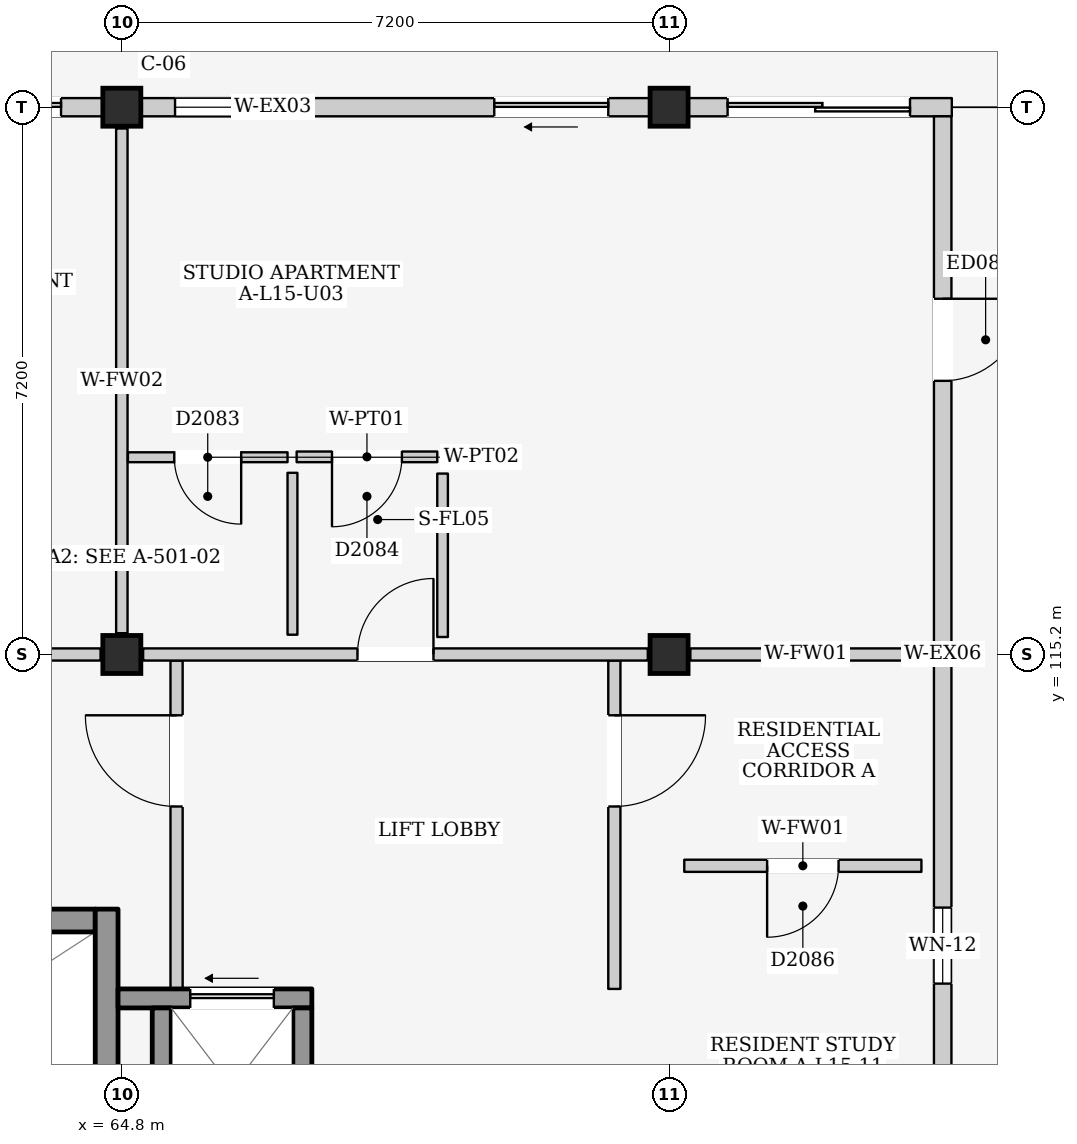
"""IFC4 building model, lengths in metres.
Left out: names, types, materials, properties, quantities, classifications, styles, units other than length and angle.
Written with IfcOpenShell. Run it as: python <this file> out.ifc"""

import sys

from ifc_helpers import new_model, si_unit, direction, frame, frame_2d, origin, origin_2d, place, context, subcontext, project, spatial, rectangle, extrude, element, fill, save


model = new_model("IFC4")
c1 = context("Model", 3, precision=1e-05, world=origin(), true_north=direction((0.0, 1.0)))
c2 = subcontext(c1, "Body", "Model", "MODEL_VIEW")
j1 = project(units=[si_unit("LENGTHUNIT", "METRE"), si_unit("PLANEANGLEUNIT", "RADIAN")], contexts=[c1])
p1 = place(None, origin())
s1 = spatial("IfcSite", under=j1, at=p1, CompositionType="ELEMENT")
p2 = place(p1, origin())
s2 = spatial("IfcBuilding", under=s1, at=p2, CompositionType="ELEMENT")
p3 = place(p2, frame((0.0, 0.0, 50.9)))
s3 = spatial("IfcBuildingStorey", under=s2, at=p3, CompositionType="ELEMENT", Elevation=50.9)
for number, where, z_axis, x_axis in (
    (1, (64.8, 115.2, 0.0), (0.0, 0.0, 1.0), (1.0, 0.0, 0.0)),
    (2, (64.8, 122.4, 0.0), (0.0, 0.0, 1.0), (1.0, 0.0, 0.0)),
    (3, (72.0, 115.2, 0.0), (0.0, 0.0, 1.0), (1.0, 0.0, 0.0)),
    (4, (72.0, 122.4, 0.0), (0.0, 0.0, 1.0), (1.0, 0.0, 0.0)),
):
    element("IfcColumn", number, at=place(p3, frame(where, z_axis=z_axis, x_axis=x_axis)), inside=s3, PredefinedType="COLUMN", context=c2, shape_type="SweptSolid", body=[
        extrude(rectangle(XDim=0.5, YDim=0.5, at=origin_2d()), origin(), (0.0, 0.0, 1.0), 3.2),
    ])
p4 = place(p3, frame((57.85, 122.4, 0.0), z_axis=(0.0, 0.0, 1.0), x_axis=(1.0, 0.0, 0.0)))
e5 = element("IfcWall", 5, at=p4, inside=s3, PredefinedType="ELEMENTEDWALL", context=c2, shape_type="SweptSolid", body=[
    extrude(rectangle(XDim=6.7, YDim=0.24, at=frame_2d((3.35, 0.0))), origin(), (0.0, 0.0, 1.0), 2.495),
])
p5 = place(p4, frame((4.55, 0.0, 0.0)))
e6 = element("IfcOpeningElement", 6, at=p5, cuts=e5, PredefinedType="OPENING", context=c2, shape_type="SweptSolid", body=[
    extrude(rectangle(XDim=1.6, YDim=2.12, at=frame_2d((0.8, 1.06))), frame((0.0, 0.135, 0.0), z_axis=(0.0, -1.0, 0.0), x_axis=(1.0, 0.0, 0.0)), (0.0, 0.0, 1.0), 0.27),
])
p6 = place(p4, frame((0.45, 0.0, 0.835)))
e7 = element("IfcOpeningElement", 7, at=p6, cuts=e5, PredefinedType="OPENING", context=c2, shape_type="SweptSolid", body=[
    extrude(rectangle(XDim=1.75, YDim=1.55, at=frame_2d((0.875, 0.775))), frame((0.0, 0.135, 0.0), z_axis=(0.0, -1.0, 0.0), x_axis=(1.0, 0.0, 0.0)), (0.0, 0.0, 1.0), 0.27),
])
p7 = place(p3, frame((65.05, 122.4, 0.0), z_axis=(0.0, 0.0, 1.0), x_axis=(1.0, 0.0, 0.0)))
e8 = element("IfcWall", 8, at=p7, inside=s3, PredefinedType="ELEMENTEDWALL", context=c2, shape_type="SweptSolid", body=[
    extrude(rectangle(XDim=6.7, YDim=0.24, at=frame_2d((3.35, 0.0))), origin(), (0.0, 0.0, 1.0), 2.495),
])
p8 = place(p7, frame((4.65, 0.0, 0.0)))
e9 = element("IfcOpeningElement", 9, at=p8, cuts=e8, PredefinedType="OPENING", context=c2, shape_type="SweptSolid", body=[
    extrude(rectangle(XDim=1.5, YDim=2.12, at=frame_2d((0.75, 1.06))), frame((0.0, 0.135, 0.0), z_axis=(0.0, -1.0, 0.0), x_axis=(1.0, 0.0, 0.0)), (0.0, 0.0, 1.0), 0.27),
])
p9 = place(p7, frame((0.45, 0.0, 0.885)))
e10 = element("IfcOpeningElement", 10, at=p9, cuts=e8, PredefinedType="OPENING", context=c2, shape_type="SweptSolid", body=[
    extrude(rectangle(XDim=1.8, YDim=1.5, at=frame_2d((0.9, 0.75))), frame((0.0, 0.135, 0.0), z_axis=(0.0, -1.0, 0.0), x_axis=(1.0, 0.0, 0.0)), (0.0, 0.0, 1.0), 0.27),
])
p10 = place(p3, frame((72.25, 122.4, 0.0), z_axis=(0.0, 0.0, 1.0), x_axis=(1.0, 0.0, 0.0)))
e11 = element("IfcWall", 11, at=p10, inside=s3, PredefinedType="ELEMENTEDWALL", context=c2, shape_type="SweptSolid", body=[
    extrude(rectangle(XDim=3.47, YDim=0.24, at=frame_2d((1.735, 0.0))), origin(), (0.0, 0.0, 1.0), 2.295),
])
p11 = place(p10, frame((0.52, 0.0, 0.0)))
e12 = element("IfcOpeningElement", 12, at=p11, cuts=e11, PredefinedType="OPENING", context=c2, shape_type="SweptSolid", body=[
    extrude(rectangle(XDim=2.4, YDim=2.12, at=frame_2d((1.2, 1.06))), frame((0.0, 0.135, 0.0), z_axis=(0.0, -1.0, 0.0), x_axis=(1.0, 0.0, 0.0)), (0.0, 0.0, 1.0), 0.27),
])
p12 = place(p3, frame((75.6, 108.12, 0.0), z_axis=(0.0, 0.0, 1.0), x_axis=(0.0, 1.0, 0.0)))
e13 = element("IfcWall", 13, at=p12, inside=s3, PredefinedType="ELEMENTEDWALL", context=c2, shape_type="SweptSolid", body=[
    extrude(rectangle(XDim=7.08, YDim=0.23, at=frame_2d((3.54, 0.0))), origin(), (0.0, 0.0, 1.0), 2.395),
])
p13 = place(p12, frame((2.75, 0.0, 1.1)))
e14 = element("IfcOpeningElement", 14, at=p13, cuts=e13, PredefinedType="OPENING", context=c2, shape_type="SweptSolid", body=[
    extrude(rectangle(XDim=1.0, YDim=0.9, at=frame_2d((0.5, 0.45))), frame((0.0, 0.13, 0.0), z_axis=(0.0, -1.0, 0.0), x_axis=(1.0, 0.0, 0.0)), (0.0, 0.0, 1.0), 0.26),
])
p14 = place(p3, frame((75.6, 115.2, 0.0), z_axis=(0.0, 0.0, 1.0), x_axis=(0.0, 1.0, 0.0)))
e15 = element("IfcWall", 15, at=p14, inside=s3, PredefinedType="ELEMENTEDWALL", context=c2, shape_type="SweptSolid", body=[
    extrude(rectangle(XDim=7.08, YDim=0.23, at=frame_2d((3.54, 0.0))), origin(), (0.0, 0.0, 1.0), 2.395),
])
p15 = place(p14, frame((3.6, 0.0, 0.0)))
e16 = element("IfcOpeningElement", 16, at=p15, cuts=e15, PredefinedType="OPENING", context=c2, shape_type="SweptSolid", body=[
    extrude(rectangle(XDim=1.08, YDim=2.12, at=frame_2d((0.54, 1.06))), frame((0.0, 0.13, 0.0), z_axis=(0.0, -1.0, 0.0), x_axis=(1.0, 0.0, 0.0)), (0.0, 0.0, 1.0), 0.26),
])
p16 = place(p3, frame((57.95, 111.7, 0.0), z_axis=(0.0, 0.0, 1.0), x_axis=(1.0, 0.0, 0.0)))
e17 = element("IfcWall", 17, at=p16, inside=s3, PredefinedType="SHEAR", context=c2, shape_type="SweptSolid", body=[
    extrude(rectangle(XDim=6.5, YDim=0.3, at=frame_2d((3.25, 0.0))), origin(), (0.0, 0.0, 1.0), 2.96),
])
p17 = place(p16, frame((0.18, 0.0, 0.0)))
e18 = element("IfcOpeningElement", 18, at=p17, cuts=e17, PredefinedType="OPENING", context=c2, shape_type="SweptSolid", body=[
    extrude(rectangle(XDim=1.15, YDim=2.2, at=frame_2d((0.575, 1.1))), frame((0.0, 0.165, 0.0), z_axis=(0.0, -1.0, 0.0), x_axis=(1.0, 0.0, 0.0)), (0.0, 0.0, 1.0), 0.33),
])
p18 = place(p3, frame((64.6, 108.15, 0.0), z_axis=(0.0, 0.0, 1.0), x_axis=(0.0, 1.0, 0.0)))
e19 = element("IfcWall", 19, at=p18, inside=s3, PredefinedType="SHEAR", context=c2, shape_type="SweptSolid", body=[
    extrude(rectangle(XDim=3.7, YDim=0.3, at=frame_2d((1.85, 0.0))), origin(), (0.0, 0.0, 1.0), 2.96),
])
p19 = place(p3, frame((65.52, 110.8, 0.0), z_axis=(0.0, 0.0, 1.0), x_axis=(0.0, 1.0, 0.0)))
e20 = element("IfcWall", 20, at=p19, inside=s3, PredefinedType="PARTITIONING", context=c2, shape_type="SweptSolid", body=[
    extrude(rectangle(XDim=4.32, YDim=0.16, at=frame_2d((2.16, 0.0))), origin(), (0.0, 0.0, 1.0), 2.96),
])
p20 = place(p19, frame((2.4, 0.0, 0.0)))
e21 = element("IfcOpeningElement", 21, at=p20, cuts=e20, PredefinedType="OPENING", context=c2, shape_type="SweptSolid", body=[
    extrude(rectangle(XDim=1.2, YDim=2.2, at=frame_2d((0.6, 1.1))), frame((0.0, 0.095, 0.0), z_axis=(0.0, -1.0, 0.0), x_axis=(1.0, 0.0, 0.0)), (0.0, 0.0, 1.0), 0.19),
])
p21 = place(p3, frame((71.28, 110.8, 0.0), z_axis=(0.0, 0.0, 1.0), x_axis=(0.0, 1.0, 0.0)))
e22 = element("IfcWall", 22, at=p21, inside=s3, PredefinedType="PARTITIONING", context=c2, shape_type="SweptSolid", body=[
    extrude(rectangle(XDim=4.32, YDim=0.16, at=frame_2d((2.16, 0.0))), origin(), (0.0, 0.0, 1.0), 2.96),
])
p22 = place(p21, frame((2.4, 0.0, 0.0)))
e23 = element("IfcOpeningElement", 23, at=p22, cuts=e22, PredefinedType="OPENING", context=c2, shape_type="SweptSolid", body=[
    extrude(rectangle(XDim=1.2, YDim=2.2, at=frame_2d((0.6, 1.1))), frame((0.0, 0.095, 0.0), z_axis=(0.0, -1.0, 0.0), x_axis=(1.0, 0.0, 0.0)), (0.0, 0.0, 1.0), 0.19),
])
p23 = place(p3, frame((64.75, 110.675, 0.0), z_axis=(0.0, 0.0, 1.0), x_axis=(1.0, 0.0, 0.0)))
e24 = element("IfcWall", 24, at=p23, inside=s3, PredefinedType="SHEAR", context=c2, shape_type="SweptSolid", body=[
    extrude(rectangle(XDim=2.55, YDim=0.25, at=frame_2d((1.275, 0.0))), origin(), (0.0, 0.0, 1.0), 2.96),
])
p24 = place(p23, frame((0.95, 0.0, 0.0)))
e25 = element("IfcOpeningElement", 25, at=p24, cuts=e24, PredefinedType="OPENING", context=c2, shape_type="SweptSolid", body=[
    extrude(rectangle(XDim=1.1, YDim=2.15, at=frame_2d((0.55, 1.075))), frame((0.0, 0.14, 0.0), z_axis=(0.0, -1.0, 0.0), x_axis=(1.0, 0.0, 0.0)), (0.0, 0.0, 1.0), 0.28),
])
for number, where, z_axis, x_axis in (
    (26, (65.325, 108.45, 0.0), (0.0, 0.0, 1.0), (0.0, 1.0, 0.0)),
    (27, (67.175, 108.45, 0.0), (0.0, 0.0, 1.0), (0.0, 1.0, 0.0)),
):
    element("IfcWall", number, at=place(p3, frame(where, z_axis=z_axis, x_axis=x_axis)), inside=s3, PredefinedType="SHEAR", context=c2, shape_type="SweptSolid", body=[
        extrude(rectangle(XDim=2.1, YDim=0.25, at=frame_2d((1.05, 0.0))), origin(), (0.0, 0.0, 1.0), 2.96),
    ])
p25 = place(p3, frame((57.88, 115.2, 0.0), z_axis=(0.0, 0.0, 1.0), x_axis=(1.0, 0.0, 0.0)))
e28 = element("IfcWall", 28, at=p25, inside=s3, PredefinedType="PARTITIONING", context=c2, shape_type="SweptSolid", body=[
    extrude(rectangle(XDim=6.64, YDim=0.16, at=frame_2d((3.32, 0.0))), origin(), (0.0, 0.0, 1.0), 2.295),
])
p26 = place(p25, frame((2.82, 0.0, 0.0)))
e29 = element("IfcOpeningElement", 29, at=p26, cuts=e28, PredefinedType="OPENING", context=c2, shape_type="SweptSolid", body=[
    extrude(rectangle(XDim=1.0, YDim=2.15, at=frame_2d((0.5, 1.075))), frame((0.0, 0.095, 0.0), z_axis=(0.0, -1.0, 0.0), x_axis=(1.0, 0.0, 0.0)), (0.0, 0.0, 1.0), 0.19),
])
p27 = place(p3, frame((64.8, 115.48, 0.0), z_axis=(0.0, 0.0, 1.0), x_axis=(0.0, 1.0, 0.0)))
e30 = element("IfcWall", 30, at=p27, inside=s3, PredefinedType="PARTITIONING", context=c2, shape_type="SweptSolid", body=[
    extrude(rectangle(XDim=6.64, YDim=0.15, at=frame_2d((3.32, 0.0))), origin(), (0.0, 0.0, 1.0), 2.445),
])
p28 = place(p3, frame((65.08, 115.2, 0.0), z_axis=(0.0, 0.0, 1.0), x_axis=(1.0, 0.0, 0.0)))
e31 = element("IfcWall", 31, at=p28, inside=s3, PredefinedType="PARTITIONING", context=c2, shape_type="SweptSolid", body=[
    extrude(rectangle(XDim=6.64, YDim=0.16, at=frame_2d((3.32, 0.0))), origin(), (0.0, 0.0, 1.0), 2.295),
])
p29 = place(p28, frame((2.82, 0.0, 0.0)))
e32 = element("IfcOpeningElement", 32, at=p29, cuts=e31, PredefinedType="OPENING", context=c2, shape_type="SweptSolid", body=[
    extrude(rectangle(XDim=1.0, YDim=2.15, at=frame_2d((0.5, 1.075))), frame((0.0, 0.095, 0.0), z_axis=(0.0, -1.0, 0.0), x_axis=(1.0, 0.0, 0.0)), (0.0, 0.0, 1.0), 0.19),
])
p30 = place(p3, frame((72.28, 115.2, 0.0), z_axis=(0.0, 0.0, 1.0), x_axis=(1.0, 0.0, 0.0)))
e33 = element("IfcWall", 33, at=p30, inside=s3, PredefinedType="PARTITIONING", context=c2, shape_type="SweptSolid", body=[
    extrude(rectangle(XDim=3.04, YDim=0.16, at=frame_2d((1.52, 0.0))), origin(), (0.0, 0.0, 1.0), 2.295),
])
p31 = place(p3, frame((64.88, 117.795, 0.0), z_axis=(0.0, 0.0, 1.0), x_axis=(1.0, 0.0, 0.0)))
e34 = element("IfcWall", 34, at=p31, inside=s3, PredefinedType="PARTITIONING", context=c2, shape_type="SweptSolid", body=[
    extrude(rectangle(XDim=2.1, YDim=0.13, at=frame_2d((1.05, 0.0))), origin(), (0.0, 0.0, 1.0), 2.96),
])
p32 = place(p31, frame((0.61, 0.0, 0.0)))
e35 = element("IfcOpeningElement", 35, at=p32, cuts=e34, PredefinedType="OPENING", context=c2, shape_type="SweptSolid", body=[
    extrude(rectangle(XDim=0.88, YDim=2.1, at=frame_2d((0.44, 1.05))), frame((0.0, 0.08, 0.0), z_axis=(0.0, -1.0, 0.0), x_axis=(1.0, 0.0, 0.0)), (0.0, 0.0, 1.0), 0.16),
])
p33 = place(p3, frame((67.045, 115.46, 0.0), z_axis=(0.0, 0.0, 1.0), x_axis=(0.0, 1.0, 0.0)))
e36 = element("IfcWall", 36, at=p33, inside=s3, PredefinedType="PARTITIONING", context=c2, shape_type="SweptSolid", body=[
    extrude(rectangle(XDim=2.13, YDim=0.13, at=frame_2d((1.065, 0.0))), origin(), (0.0, 0.0, 1.0), 2.96),
])
p34 = place(p3, frame((67.1, 117.8, 0.0), z_axis=(0.0, 0.0, 1.0), x_axis=(1.0, 0.0, 0.0)))
e37 = element("IfcWall", 37, at=p34, inside=s3, PredefinedType="PARTITIONING", context=c2, shape_type="SweptSolid", body=[
    extrude(rectangle(XDim=1.85, YDim=0.14, at=frame_2d((0.925, 0.0))), origin(), (0.0, 0.0, 1.0), 2.96),
])
p35 = place(p34, frame((0.465, 0.0, 0.0)))
e38 = element("IfcOpeningElement", 38, at=p35, cuts=e37, PredefinedType="OPENING", context=c2, shape_type="SweptSolid", body=[
    extrude(rectangle(XDim=0.92, YDim=2.1, at=frame_2d((0.46, 1.05))), frame((0.0, 0.085, 0.0), z_axis=(0.0, -1.0, 0.0), x_axis=(1.0, 0.0, 0.0)), (0.0, 0.0, 1.0), 0.17),
])
p36 = place(p3, frame((69.02, 115.43, 0.0), z_axis=(0.0, 0.0, 1.0), x_axis=(0.0, 1.0, 0.0)))
e39 = element("IfcWall", 39, at=p36, inside=s3, PredefinedType="PARTITIONING", context=c2, shape_type="SweptSolid", body=[
    extrude(rectangle(XDim=2.15, YDim=0.14, at=frame_2d((1.075, 0.0))), origin(), (0.0, 0.0, 1.0), 2.96),
])
p37 = place(p3, frame((72.2, 112.42, 0.0), z_axis=(0.0, 0.0, 1.0), x_axis=(1.0, 0.0, 0.0)))
e40 = element("IfcWall", 40, at=p37, inside=s3, PredefinedType="PARTITIONING", context=c2, shape_type="SweptSolid", body=[
    extrude(rectangle(XDim=3.12, YDim=0.16, at=frame_2d((1.56, 0.0))), origin(), (0.0, 0.0, 1.0), 2.96),
])
p38 = place(p37, frame((1.09, 0.0, 0.0)))
e41 = element("IfcOpeningElement", 41, at=p38, cuts=e40, PredefinedType="OPENING", context=c2, shape_type="SweptSolid", body=[
    extrude(rectangle(XDim=0.94, YDim=2.12, at=frame_2d((0.47, 1.06))), frame((0.0, 0.095, 0.0), z_axis=(0.0, -1.0, 0.0), x_axis=(1.0, 0.0, 0.0)), (0.0, 0.0, 1.0), 0.19),
])
p39 = place(p5, frame((1.6, 0.0, 0.0), z_axis=(0.0, 0.0, 1.0), x_axis=(-1.0, 0.0, 0.0)))
e42 = element("IfcDoor", 42, at=p39, inside=s3, OperationType="SLIDING_TO_RIGHT", PredefinedType="DOOR", context=c2, shape_type="SweptSolid", body=[
    extrude(rectangle(XDim=1.6, YDim=2.12, at=frame_2d((0.8, 1.06))), frame((0.0, 0.025, 0.0), z_axis=(0.0, -1.0, 0.0), x_axis=(1.0, 0.0, 0.0)), (0.0, 0.0, 1.0), 0.05),
])
fill(e6, e42)
p40 = place(p8, frame((1.5, 0.0, 0.0), z_axis=(0.0, 0.0, 1.0), x_axis=(-1.0, 0.0, 0.0)))
e43 = element("IfcDoor", 43, at=p40, inside=s3, OperationType="SLIDING_TO_LEFT", PredefinedType="DOOR", context=c2, shape_type="SweptSolid", body=[
    extrude(rectangle(XDim=1.5, YDim=2.12, at=frame_2d((0.75, 1.06))), frame((0.0, 0.025, 0.0), z_axis=(0.0, -1.0, 0.0), x_axis=(1.0, 0.0, 0.0)), (0.0, 0.0, 1.0), 0.05),
])
fill(e9, e43)
p41 = place(p9, origin())
e44 = element("IfcWindow", 44, at=p41, inside=s3, PartitioningType="DOUBLE_PANEL_VERTICAL", PredefinedType="WINDOW", context=c2, shape_type="SweptSolid", body=[
    extrude(rectangle(XDim=1.8, YDim=1.5, at=frame_2d((0.9, 0.75))), frame((0.0, 0.03, 0.0), z_axis=(0.0, -1.0, 0.0), x_axis=(1.0, 0.0, 0.0)), (0.0, 0.0, 1.0), 0.06),
])
fill(e10, e44)
p42 = place(p11, frame((2.4, 0.0, 0.0), z_axis=(0.0, 0.0, 1.0), x_axis=(-1.0, 0.0, 0.0)))
e45 = element("IfcDoor", 45, at=p42, inside=s3, OperationType="DOUBLE_DOOR_SLIDING", PredefinedType="DOOR", context=c2, shape_type="SweptSolid", body=[
    extrude(rectangle(XDim=2.4, YDim=2.12, at=frame_2d((1.2, 1.06))), frame((0.0, 0.025, 0.0), z_axis=(0.0, -1.0, 0.0), x_axis=(1.0, 0.0, 0.0)), (0.0, 0.0, 1.0), 0.05),
])
fill(e12, e45)
p43 = place(p13, origin())
e46 = element("IfcWindow", 46, at=p43, inside=s3, PartitioningType="SINGLE_PANEL", PredefinedType="WINDOW", context=c2, shape_type="SweptSolid", body=[
    extrude(rectangle(XDim=1.0, YDim=0.9, at=frame_2d((0.5, 0.45))), frame((0.0, 0.03, 0.0), z_axis=(0.0, -1.0, 0.0), x_axis=(1.0, 0.0, 0.0)), (0.0, 0.0, 1.0), 0.06),
])
fill(e14, e46)
p44 = place(p15, frame((1.08, 0.0, 0.0), z_axis=(0.0, 0.0, 1.0), x_axis=(-1.0, 0.0, 0.0)))
e47 = element("IfcDoor", 47, at=p44, inside=s3, OperationType="SINGLE_SWING_LEFT", PredefinedType="DOOR", context=c2, shape_type="SweptSolid", body=[
    extrude(rectangle(XDim=1.08, YDim=2.12, at=frame_2d((0.54, 1.06))), frame((0.0, 0.025, 0.0), z_axis=(0.0, -1.0, 0.0), x_axis=(1.0, 0.0, 0.0)), (0.0, 0.0, 1.0), 0.05),
])
fill(e16, e47)
p45 = place(p20, origin())
e48 = element("IfcDoor", 48, at=p45, inside=s3, OperationType="SINGLE_SWING_RIGHT", PredefinedType="DOOR", context=c2, shape_type="SweptSolid", body=[
    extrude(rectangle(XDim=1.2, YDim=2.2, at=frame_2d((0.6, 1.1))), frame((0.0, 0.025, 0.0), z_axis=(0.0, -1.0, 0.0), x_axis=(1.0, 0.0, 0.0)), (0.0, 0.0, 1.0), 0.05),
])
fill(e21, e48)
p46 = place(p22, frame((1.2, 0.0, 0.0), z_axis=(0.0, 0.0, 1.0), x_axis=(-1.0, 0.0, 0.0)))
e49 = element("IfcDoor", 49, at=p46, inside=s3, OperationType="SINGLE_SWING_LEFT", PredefinedType="DOOR", context=c2, shape_type="SweptSolid", body=[
    extrude(rectangle(XDim=1.2, YDim=2.2, at=frame_2d((0.6, 1.1))), frame((0.0, 0.025, 0.0), z_axis=(0.0, -1.0, 0.0), x_axis=(1.0, 0.0, 0.0)), (0.0, 0.0, 1.0), 0.05),
])
fill(e23, e49)
p47 = place(p24, origin())
e50 = element("IfcDoor", 50, at=p47, inside=s3, OperationType="SLIDING_TO_LEFT", PredefinedType="DOOR", context=c2, shape_type="SweptSolid", body=[
    extrude(rectangle(XDim=1.1, YDim=2.15, at=frame_2d((0.55, 1.075))), frame((0.0, 0.025, 0.0), z_axis=(0.0, -1.0, 0.0), x_axis=(1.0, 0.0, 0.0)), (0.0, 0.0, 1.0), 0.05),
])
fill(e25, e50)
p48 = place(p29, origin())
e51 = element("IfcDoor", 51, at=p48, inside=s3, OperationType="SINGLE_SWING_RIGHT", PredefinedType="DOOR", context=c2, shape_type="SweptSolid", body=[
    extrude(rectangle(XDim=1.0, YDim=2.15, at=frame_2d((0.5, 1.075))), frame((0.0, 0.025, 0.0), z_axis=(0.0, -1.0, 0.0), x_axis=(1.0, 0.0, 0.0)), (0.0, 0.0, 1.0), 0.05),
])
fill(e32, e51)
p49 = place(p32, frame((0.88, 0.0, 0.0), z_axis=(0.0, 0.0, 1.0), x_axis=(-1.0, 0.0, 0.0)))
e52 = element("IfcDoor", 52, at=p49, inside=s3, OperationType="SINGLE_SWING_LEFT", PredefinedType="DOOR", context=c2, shape_type="SweptSolid", body=[
    extrude(rectangle(XDim=0.88, YDim=2.1, at=frame_2d((0.44, 1.05))), frame((0.0, 0.025, 0.0), z_axis=(0.0, -1.0, 0.0), x_axis=(1.0, 0.0, 0.0)), (0.0, 0.0, 1.0), 0.05),
])
fill(e35, e52)
p50 = place(p35, frame((0.92, 0.0, 0.0), z_axis=(0.0, 0.0, 1.0), x_axis=(-1.0, 0.0, 0.0)))
e53 = element("IfcDoor", 53, at=p50, inside=s3, OperationType="SINGLE_SWING_RIGHT", PredefinedType="DOOR", context=c2, shape_type="SweptSolid", body=[
    extrude(rectangle(XDim=0.92, YDim=2.1, at=frame_2d((0.46, 1.05))), frame((0.0, 0.025, 0.0), z_axis=(0.0, -1.0, 0.0), x_axis=(1.0, 0.0, 0.0)), (0.0, 0.0, 1.0), 0.05),
])
fill(e38, e53)
p51 = place(p38, frame((0.94, 0.0, 0.0), z_axis=(0.0, 0.0, 1.0), x_axis=(-1.0, 0.0, 0.0)))
e54 = element("IfcDoor", 54, at=p51, inside=s3, OperationType="SINGLE_SWING_RIGHT", PredefinedType="DOOR", context=c2, shape_type="SweptSolid", body=[
    extrude(rectangle(XDim=0.94, YDim=2.12, at=frame_2d((0.47, 1.06))), frame((0.0, 0.025, 0.0), z_axis=(0.0, -1.0, 0.0), x_axis=(1.0, 0.0, 0.0)), (0.0, 0.0, 1.0), 0.05),
])
fill(e41, e54)
save(model, sys.argv[1])
